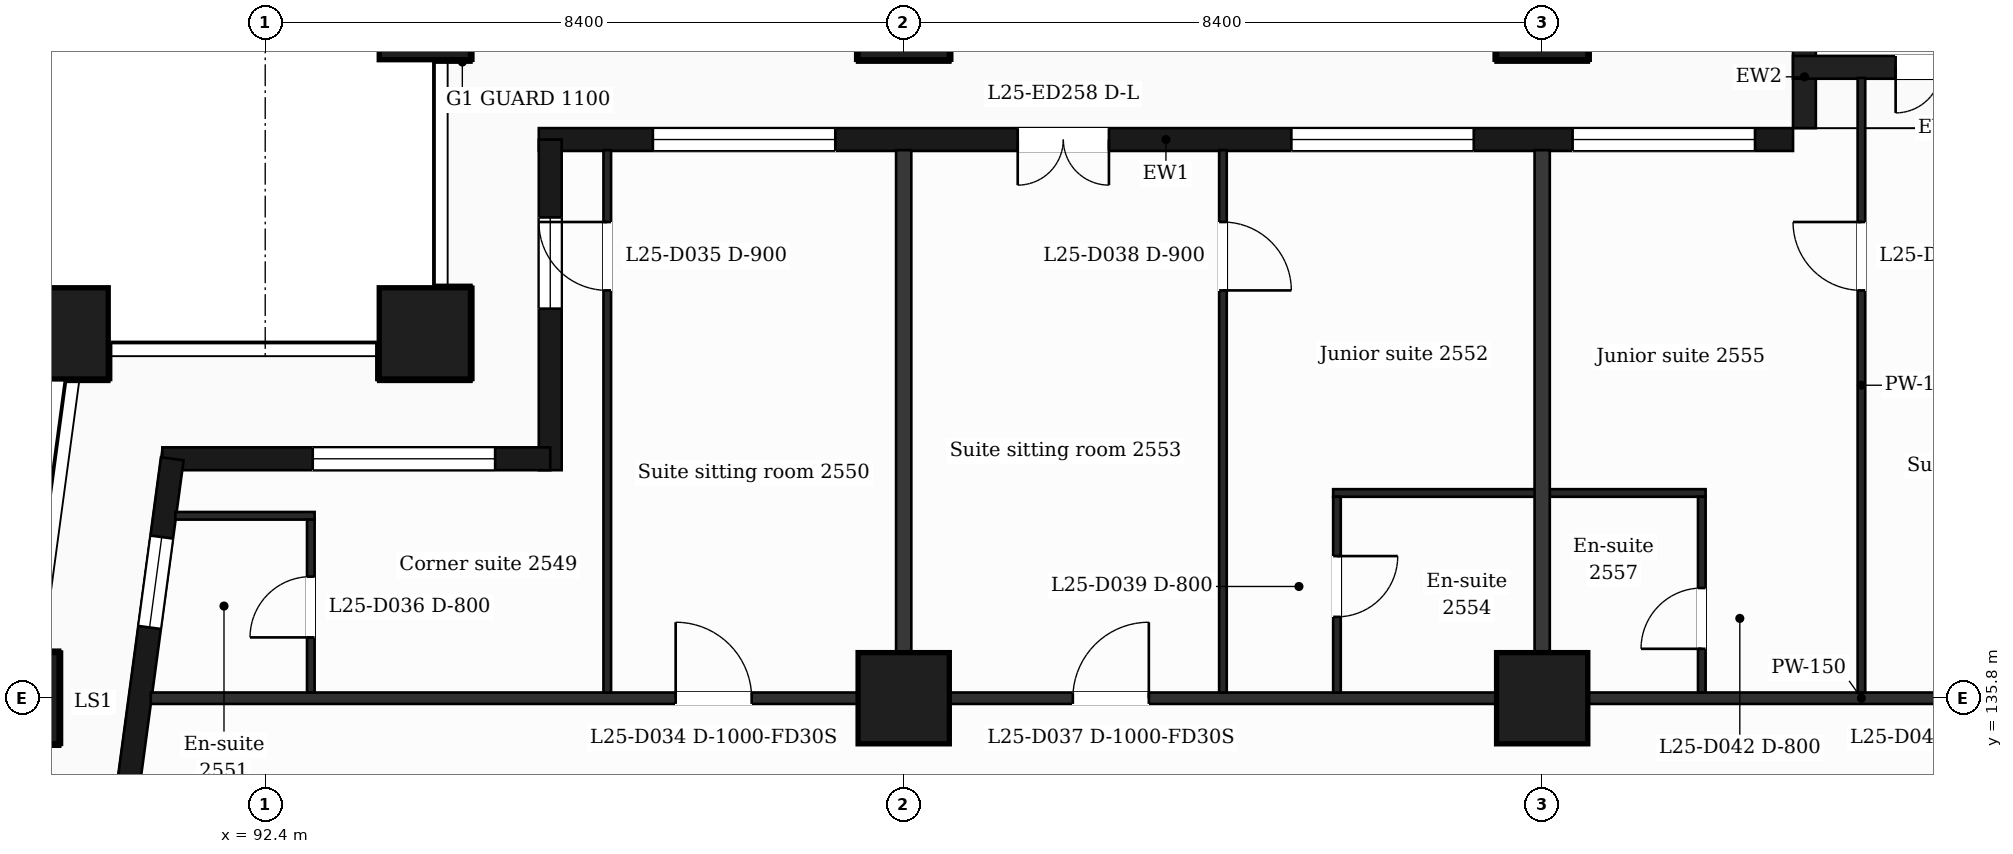
"""IFC4 building model, lengths in metres.
Left out: names, types, materials, properties, quantities, classifications, styles, units other than length and angle.
Written with IfcOpenShell. Run it as: python <this file> out.ifc"""

import sys

from ifc_helpers import new_model, si_unit, direction, frame, frame_2d, origin, origin_2d, place, context, subcontext, project, spatial, rectangle, extrude, element, fill, save


model = new_model("IFC4")
c1 = context("Model", 3, precision=1e-05, world=origin(), true_north=direction((0.0, 1.0)))
c2 = subcontext(c1, "Body", "Model", "MODEL_VIEW")
j1 = project(units=[si_unit("LENGTHUNIT", "METRE"), si_unit("PLANEANGLEUNIT", "RADIAN")], contexts=[c1])
p1 = place(None, origin())
s1 = spatial("IfcSite", under=j1, at=p1, CompositionType="ELEMENT")
p2 = place(p1, origin())
s2 = spatial("IfcBuilding", under=s1, at=p2, CompositionType="ELEMENT")
p3 = place(p2, frame((0.0, 0.0, 109.5)))
s3 = spatial("IfcBuildingStorey", under=s2, at=p3, CompositionType="ELEMENT", Elevation=109.5)
for number, where, z_axis, x_axis in (
    (1, (94.5, 140.6, 0.0), (0.0, 0.0, 1.0), (1.0, 0.0, 0.0)),
    (2, (89.735, 140.6, 0.0), (0.0, 0.0, 1.0), (1.0, 0.0, 0.0)),
    (3, (100.8, 135.8, 0.0), (0.0, 0.0, 1.0), (1.0, 0.0, 0.0)),
    (4, (109.2, 135.8, 0.0), (0.0, 0.0, 1.0), (1.0, 0.0, 0.0)),
    (5, (89.088, 135.8, 0.0), (0.0, 0.0, 1.0), (1.0, 0.0, 0.0)),
    (6, (100.8, 144.8, 0.0), (0.0, 0.0, 1.0), (1.0, 0.0, 0.0)),
    (7, (109.2, 144.8, 0.0), (0.0, 0.0, 1.0), (1.0, 0.0, 0.0)),
    (8, (94.5, 144.8, 0.0), (0.0, 0.0, 1.0), (1.0, 0.0, 0.0)),
):
    element("IfcColumn", number, at=place(p3, frame(where, z_axis=z_axis, x_axis=x_axis)), inside=s3, PredefinedType="COLUMN", context=c2, shape_type="SweptSolid", body=[
        extrude(rectangle(XDim=1.2, YDim=1.2, at=origin_2d()), origin(), (0.0, 0.0, 1.0), 3.7),
    ])
p4 = place(p3, frame((112.5, 143.15, 0.0), z_axis=(0.0, 0.0, 1.0), x_axis=(-1.0, 0.0, 0.0)))
e9 = element("IfcWall", 9, at=p4, inside=s3, PredefinedType="SOLIDWALL", context=c2, shape_type="SweptSolid", body=[
    extrude(rectangle(XDim=16.5, YDim=0.3, at=frame_2d((8.25, 0.0))), origin(), (0.0, 0.0, 1.0), 3.38),
])
p5 = place(p4, frame((0.5, 0.0, 0.9)))
e10 = element("IfcOpeningElement", 10, at=p5, cuts=e9, PredefinedType="OPENING", context=c2, shape_type="SweptSolid", body=[
    extrude(rectangle(XDim=2.4, YDim=2.1, at=frame_2d((1.2, 1.05))), frame((0.0, 0.16, 0.0), z_axis=(0.0, -1.0, 0.0), x_axis=(1.0, 0.0, 0.0)), (0.0, 0.0, 1.0), 0.32),
])
p6 = place(p4, frame((4.2, 0.0, 0.9)))
e11 = element("IfcOpeningElement", 11, at=p6, cuts=e9, PredefinedType="OPENING", context=c2, shape_type="SweptSolid", body=[
    extrude(rectangle(XDim=2.4, YDim=2.1, at=frame_2d((1.2, 1.05))), frame((0.0, 0.16, 0.0), z_axis=(0.0, -1.0, 0.0), x_axis=(1.0, 0.0, 0.0)), (0.0, 0.0, 1.0), 0.32),
])
p7 = place(p4, frame((9.0, 0.0, 0.0)))
e12 = element("IfcOpeningElement", 12, at=p7, cuts=e9, PredefinedType="OPENING", context=c2, shape_type="SweptSolid", body=[
    extrude(rectangle(XDim=1.2, YDim=2.4, at=frame_2d((0.6, 1.2))), frame((0.0, 0.16, 0.0), z_axis=(0.0, -1.0, 0.0), x_axis=(1.0, 0.0, 0.0)), (0.0, 0.0, 1.0), 0.32),
])
p8 = place(p4, frame((12.6, 0.0, 0.9)))
e13 = element("IfcOpeningElement", 13, at=p8, cuts=e9, PredefinedType="OPENING", context=c2, shape_type="SweptSolid", body=[
    extrude(rectangle(XDim=2.4, YDim=2.1, at=frame_2d((1.2, 1.05))), frame((0.0, 0.16, 0.0), z_axis=(0.0, -1.0, 0.0), x_axis=(1.0, 0.0, 0.0)), (0.0, 0.0, 1.0), 0.32),
])
p9 = place(p3, frame((112.65, 143.3, 0.0), z_axis=(0.0, 0.0, 1.0), x_axis=(0.0, 1.0, 0.0)))
e14 = element("IfcWall", 14, at=p9, inside=s3, PredefinedType="SOLIDWALL", context=c2, shape_type="SweptSolid", body=[
    extrude(rectangle(XDim=1.35, YDim=0.3, at=frame_2d((0.675, 0.0))), origin(), (0.0, 0.0, 1.0), 3.38),
])
p10 = place(p3, frame((116.4, 144.1, 0.0), z_axis=(0.0, 0.0, 1.0), x_axis=(-1.0, 0.0, 0.0)))
e15 = element("IfcWall", 15, at=p10, inside=s3, PredefinedType="SOLIDWALL", context=c2, shape_type="SweptSolid", body=[
    extrude(rectangle(XDim=3.9, YDim=0.3, at=frame_2d((1.95, 0.0))), origin(), (0.0, 0.0, 1.0), 3.38),
])
p11 = place(p10, frame((1.35, 0.0, 0.0)))
e16 = element("IfcOpeningElement", 16, at=p11, cuts=e15, PredefinedType="OPENING", context=c2, shape_type="SweptSolid", body=[
    extrude(rectangle(XDim=1.2, YDim=2.4, at=frame_2d((0.6, 1.2))), frame((0.0, 0.16, 0.0), z_axis=(0.0, -1.0, 0.0), x_axis=(1.0, 0.0, 0.0)), (0.0, 0.0, 1.0), 0.32),
])
p12 = place(p3, frame((96.15, 143.15, 0.0), z_axis=(0.0, 0.0, 1.0), x_axis=(0.0, -1.0, 0.0)))
e17 = element("IfcWall", 17, at=p12, inside=s3, PredefinedType="SOLIDWALL", context=c2, shape_type="SweptSolid", body=[
    extrude(rectangle(XDim=4.35, YDim=0.3, at=frame_2d((2.175, 0.0))), origin(), (0.0, 0.0, 1.0), 3.38),
])
p13 = place(p12, frame((1.025, 0.0, 0.9)))
e18 = element("IfcOpeningElement", 18, at=p13, cuts=e17, PredefinedType="OPENING", context=c2, shape_type="SweptSolid", body=[
    extrude(rectangle(XDim=1.2, YDim=2.1, at=frame_2d((0.6, 1.05))), frame((0.0, 0.16, 0.0), z_axis=(0.0, -1.0, 0.0), x_axis=(1.0, 0.0, 0.0)), (0.0, 0.0, 1.0), 0.32),
])
p14 = place(p3, frame((96.15, 138.95, 0.0), z_axis=(0.0, 0.0, 1.0), x_axis=(-1.0, 0.0, 0.0)))
e19 = element("IfcWall", 19, at=p14, inside=s3, PredefinedType="SOLIDWALL", context=c2, shape_type="SweptSolid", body=[
    extrude(rectangle(XDim=5.104, YDim=0.3, at=frame_2d((2.552, 0.0))), origin(), (0.0, 0.0, 1.0), 3.38),
])
p15 = place(p14, frame((0.725, 0.0, 0.9)))
e20 = element("IfcOpeningElement", 20, at=p15, cuts=e19, PredefinedType="OPENING", context=c2, shape_type="SweptSolid", body=[
    extrude(rectangle(XDim=2.4, YDim=2.1, at=frame_2d((1.2, 1.05))), frame((0.0, 0.16, 0.0), z_axis=(0.0, -1.0, 0.0), x_axis=(1.0, 0.0, 0.0)), (0.0, 0.0, 1.0), 0.32),
])
p16 = place(p3, frame((91.177, 138.95, 0.0), z_axis=(0.0, 0.0, 1.0), x_axis=(-0.133426664613, -0.991058689065, 0.0)))
e21 = element("IfcWall", 21, at=p16, inside=s3, PredefinedType="SOLIDWALL", context=c2, shape_type="SweptSolid", body=[
    extrude(rectangle(XDim=6.609, YDim=0.3, at=frame_2d((3.305, 0.0))), origin(), (0.0, 0.0, 1.0), 3.38),
])
p17 = place(p16, frame((1.039, 0.0, 0.9)))
e22 = element("IfcOpeningElement", 22, at=p17, cuts=e21, PredefinedType="OPENING", context=c2, shape_type="SweptSolid", body=[
    extrude(rectangle(XDim=1.2, YDim=2.1, at=frame_2d((0.6, 1.05))), frame((0.0, 0.16, 0.0), z_axis=(0.0, -1.0, 0.0), x_axis=(1.0, 0.0, 0.0)), (0.0, 0.0, 1.0), 0.32),
])
p18 = place(p16, frame((4.294, 0.0, 0.0)))
e23 = element("IfcOpeningElement", 23, at=p18, cuts=e21, PredefinedType="OPENING", context=c2, shape_type="SweptSolid", body=[
    extrude(rectangle(XDim=1.2, YDim=2.4, at=frame_2d((0.6, 1.2))), frame((0.0, 0.16, 0.0), z_axis=(0.0, -1.0, 0.0), x_axis=(1.0, 0.0, 0.0)), (0.0, 0.0, 1.0), 0.32),
])
p19 = place(p3, frame((90.895, 135.8, 0.0), z_axis=(0.0, 0.0, 1.0), x_axis=(1.0, 0.0, 0.0)))
e24 = element("IfcWall", 24, at=p19, inside=s3, PredefinedType="PARTITIONING", context=c2, shape_type="SweptSolid", body=[
    extrude(rectangle(XDim=45.011, YDim=0.15, at=frame_2d((22.505, 0.0))), origin(), (0.0, 0.0, 1.0), 3.38),
])
p20 = place(p19, frame((6.906, 0.0, 0.0)))
e25 = element("IfcOpeningElement", 25, at=p20, cuts=e24, PredefinedType="OPENING", context=c2, shape_type="SweptSolid", body=[
    extrude(rectangle(XDim=1.0, YDim=2.1, at=frame_2d((0.5, 1.05))), frame((0.0, 0.085, 0.0), z_axis=(0.0, -1.0, 0.0), x_axis=(1.0, 0.0, 0.0)), (0.0, 0.0, 1.0), 0.17),
])
p21 = place(p19, frame((12.13, 0.0, 0.0)))
e26 = element("IfcOpeningElement", 26, at=p21, cuts=e24, PredefinedType="OPENING", context=c2, shape_type="SweptSolid", body=[
    extrude(rectangle(XDim=1.0, YDim=2.1, at=frame_2d((0.5, 1.05))), frame((0.0, 0.085, 0.0), z_axis=(0.0, -1.0, 0.0), x_axis=(1.0, 0.0, 0.0)), (0.0, 0.0, 1.0), 0.17),
])
p22 = place(p19, frame((23.48, 0.0, 0.0)))
e27 = element("IfcOpeningElement", 27, at=p22, cuts=e24, PredefinedType="OPENING", context=c2, shape_type="SweptSolid", body=[
    extrude(rectangle(XDim=1.0, YDim=2.1, at=frame_2d((0.5, 1.05))), frame((0.0, 0.085, 0.0), z_axis=(0.0, -1.0, 0.0), x_axis=(1.0, 0.0, 0.0)), (0.0, 0.0, 1.0), 0.17),
])
p23 = place(p19, frame((27.515, 0.0, 0.0)))
e28 = element("IfcOpeningElement", 28, at=p23, cuts=e24, PredefinedType="OPENING", context=c2, shape_type="SweptSolid", body=[
    extrude(rectangle(XDim=0.95, YDim=2.1, at=frame_2d((0.475, 1.05))), frame((0.0, 0.085, 0.0), z_axis=(0.0, -1.0, 0.0), x_axis=(1.0, 0.0, 0.0)), (0.0, 0.0, 1.0), 0.17),
])
p24 = place(p19, frame((31.18, 0.0, 0.0)))
e29 = element("IfcOpeningElement", 29, at=p24, cuts=e24, PredefinedType="OPENING", context=c2, shape_type="SweptSolid", body=[
    extrude(rectangle(XDim=0.95, YDim=2.1, at=frame_2d((0.475, 1.05))), frame((0.0, 0.085, 0.0), z_axis=(0.0, -1.0, 0.0), x_axis=(1.0, 0.0, 0.0)), (0.0, 0.0, 1.0), 0.17),
])
p25 = place(p19, frame((36.005, 0.0, 0.0)))
e30 = element("IfcOpeningElement", 30, at=p25, cuts=e24, PredefinedType="OPENING", context=c2, shape_type="SweptSolid", body=[
    extrude(rectangle(XDim=1.0, YDim=2.1, at=frame_2d((0.5, 1.05))), frame((0.0, 0.085, 0.0), z_axis=(0.0, -1.0, 0.0), x_axis=(1.0, 0.0, 0.0)), (0.0, 0.0, 1.0), 0.17),
])
p26 = place(p3, frame((91.218, 138.2, 0.0), z_axis=(0.0, 0.0, 1.0), x_axis=(1.0, 0.0, 0.0)))
e31 = element("IfcWall", 31, at=p26, inside=s3, PredefinedType="PARTITIONING", context=c2, shape_type="SweptSolid", body=[
    extrude(rectangle(XDim=1.832, YDim=0.1, at=frame_2d((0.916, 0.0))), origin(), (0.0, 0.0, 1.0), 3.38),
])
p27 = place(p3, frame((106.45, 138.5, 0.0), z_axis=(0.0, 0.0, 1.0), x_axis=(1.0, 0.0, 0.0)))
e32 = element("IfcWall", 32, at=p27, inside=s3, PredefinedType="PARTITIONING", context=c2, shape_type="SweptSolid", body=[
    extrude(rectangle(XDim=4.9, YDim=0.1, at=frame_2d((2.45, 0.0))), origin(), (0.0, 0.0, 1.0), 3.38),
])
p28 = place(p3, frame((93.0, 135.875, 0.0), z_axis=(0.0, 0.0, 1.0), x_axis=(0.0, 1.0, 0.0)))
e33 = element("IfcWall", 33, at=p28, inside=s3, PredefinedType="PARTITIONING", context=c2, shape_type="SweptSolid", body=[
    extrude(rectangle(XDim=2.275, YDim=0.1, at=frame_2d((1.137, 0.0))), origin(), (0.0, 0.0, 1.0), 3.38),
])
p29 = place(p28, frame((0.725, 0.0, 0.0)))
e34 = element("IfcOpeningElement", 34, at=p29, cuts=e33, PredefinedType="OPENING", context=c2, shape_type="SweptSolid", body=[
    extrude(rectangle(XDim=0.8, YDim=2.1, at=frame_2d((0.4, 1.05))), frame((0.0, 0.06, 0.0), z_axis=(0.0, -1.0, 0.0), x_axis=(1.0, 0.0, 0.0)), (0.0, 0.0, 1.0), 0.12),
])
p30 = place(p3, frame((96.9, 135.875, 0.0), z_axis=(0.0, 0.0, 1.0), x_axis=(0.0, 1.0, 0.0)))
e35 = element("IfcWall", 35, at=p30, inside=s3, PredefinedType="PARTITIONING", context=c2, shape_type="SweptSolid", body=[
    extrude(rectangle(XDim=7.135, YDim=0.1, at=frame_2d((3.567, 0.0))), origin(), (0.0, 0.0, 1.0), 3.38),
])
p31 = place(p30, frame((5.29, 0.0, 0.0)))
e36 = element("IfcOpeningElement", 36, at=p31, cuts=e35, PredefinedType="OPENING", context=c2, shape_type="SweptSolid", body=[
    extrude(rectangle(XDim=0.9, YDim=2.1, at=frame_2d((0.45, 1.05))), frame((0.0, 0.06, 0.0), z_axis=(0.0, -1.0, 0.0), x_axis=(1.0, 0.0, 0.0)), (0.0, 0.0, 1.0), 0.12),
])
p32 = place(p3, frame((100.8, 135.875, 0.0), z_axis=(0.0, 0.0, 1.0), x_axis=(0.0, 1.0, 0.0)))
e37 = element("IfcWall", 37, at=p32, inside=s3, PredefinedType="PARTITIONING", context=c2, shape_type="SweptSolid", body=[
    extrude(rectangle(XDim=7.135, YDim=0.2, at=frame_2d((3.567, 0.0))), origin(), (0.0, 0.0, 1.0), 3.38),
])
p33 = place(p3, frame((105.0, 135.875, 0.0), z_axis=(0.0, 0.0, 1.0), x_axis=(0.0, 1.0, 0.0)))
e38 = element("IfcWall", 38, at=p33, inside=s3, PredefinedType="PARTITIONING", context=c2, shape_type="SweptSolid", body=[
    extrude(rectangle(XDim=7.135, YDim=0.1, at=frame_2d((3.567, 0.0))), origin(), (0.0, 0.0, 1.0), 3.38),
])
p34 = place(p33, frame((5.29, 0.0, 0.0)))
e39 = element("IfcOpeningElement", 39, at=p34, cuts=e38, PredefinedType="OPENING", context=c2, shape_type="SweptSolid", body=[
    extrude(rectangle(XDim=0.9, YDim=2.1, at=frame_2d((0.45, 1.05))), frame((0.0, 0.06, 0.0), z_axis=(0.0, -1.0, 0.0), x_axis=(1.0, 0.0, 0.0)), (0.0, 0.0, 1.0), 0.12),
])
p35 = place(p3, frame((106.5, 135.875, 0.0), z_axis=(0.0, 0.0, 1.0), x_axis=(0.0, 1.0, 0.0)))
e40 = element("IfcWall", 40, at=p35, inside=s3, PredefinedType="PARTITIONING", context=c2, shape_type="SweptSolid", body=[
    extrude(rectangle(XDim=2.575, YDim=0.1, at=frame_2d((1.288, 0.0))), origin(), (0.0, 0.0, 1.0), 3.38),
])
p36 = place(p35, frame((0.995, 0.0, 0.0)))
e41 = element("IfcOpeningElement", 41, at=p36, cuts=e40, PredefinedType="OPENING", context=c2, shape_type="SweptSolid", body=[
    extrude(rectangle(XDim=0.8, YDim=2.1, at=frame_2d((0.4, 1.05))), frame((0.0, 0.06, 0.0), z_axis=(0.0, -1.0, 0.0), x_axis=(1.0, 0.0, 0.0)), (0.0, 0.0, 1.0), 0.12),
])
p37 = place(p3, frame((109.2, 135.875, 0.0), z_axis=(0.0, 0.0, 1.0), x_axis=(0.0, 1.0, 0.0)))
e42 = element("IfcWall", 42, at=p37, inside=s3, PredefinedType="PARTITIONING", context=c2, shape_type="SweptSolid", body=[
    extrude(rectangle(XDim=7.135, YDim=0.2, at=frame_2d((3.567, 0.0))), origin(), (0.0, 0.0, 1.0), 3.38),
])
p38 = place(p3, frame((111.3, 135.875, 0.0), z_axis=(0.0, 0.0, 1.0), x_axis=(0.0, 1.0, 0.0)))
e43 = element("IfcWall", 43, at=p38, inside=s3, PredefinedType="PARTITIONING", context=c2, shape_type="SweptSolid", body=[
    extrude(rectangle(XDim=2.575, YDim=0.1, at=frame_2d((1.288, 0.0))), origin(), (0.0, 0.0, 1.0), 3.38),
])
p39 = place(p38, frame((0.575, 0.0, 0.0)))
e44 = element("IfcOpeningElement", 44, at=p39, cuts=e43, PredefinedType="OPENING", context=c2, shape_type="SweptSolid", body=[
    extrude(rectangle(XDim=0.8, YDim=2.1, at=frame_2d((0.4, 1.05))), frame((0.0, 0.06, 0.0), z_axis=(0.0, -1.0, 0.0), x_axis=(1.0, 0.0, 0.0)), (0.0, 0.0, 1.0), 0.12),
])
p40 = place(p3, frame((113.4, 135.875, 0.0), z_axis=(0.0, 0.0, 1.0), x_axis=(0.0, 1.0, 0.0)))
e45 = element("IfcWall", 45, at=p40, inside=s3, PredefinedType="PARTITIONING", context=c2, shape_type="SweptSolid", body=[
    extrude(rectangle(XDim=8.085, YDim=0.1, at=frame_2d((4.042, 0.0))), origin(), (0.0, 0.0, 1.0), 3.38),
])
p41 = place(p40, frame((5.29, 0.0, 0.0)))
e46 = element("IfcOpeningElement", 46, at=p41, cuts=e45, PredefinedType="OPENING", context=c2, shape_type="SweptSolid", body=[
    extrude(rectangle(XDim=0.9, YDim=2.1, at=frame_2d((0.45, 1.05))), frame((0.0, 0.06, 0.0), z_axis=(0.0, -1.0, 0.0), x_axis=(1.0, 0.0, 0.0)), (0.0, 0.0, 1.0), 0.12),
])
p42 = place(p5, origin())
e47 = element("IfcWindow", 47, at=p42, inside=s3, PartitioningType="SINGLE_PANEL", PredefinedType="WINDOW", context=c2, shape_type="SweptSolid", body=[
    extrude(rectangle(XDim=2.4, YDim=2.1, at=frame_2d((1.2, 1.05))), frame((0.0, 0.03, 0.0), z_axis=(0.0, -1.0, 0.0), x_axis=(1.0, 0.0, 0.0)), (0.0, 0.0, 1.0), 0.06),
])
fill(e10, e47)
p43 = place(p6, origin())
e48 = element("IfcWindow", 48, at=p43, inside=s3, PartitioningType="SINGLE_PANEL", PredefinedType="WINDOW", context=c2, shape_type="SweptSolid", body=[
    extrude(rectangle(XDim=2.4, YDim=2.1, at=frame_2d((1.2, 1.05))), frame((0.0, 0.03, 0.0), z_axis=(0.0, -1.0, 0.0), x_axis=(1.0, 0.0, 0.0)), (0.0, 0.0, 1.0), 0.06),
])
fill(e11, e48)
p44 = place(p7, origin())
e49 = element("IfcDoor", 49, at=p44, inside=s3, OperationType="DOUBLE_DOOR_SINGLE_SWING", PredefinedType="DOOR", context=c2, shape_type="SweptSolid", body=[
    extrude(rectangle(XDim=1.2, YDim=2.4, at=frame_2d((0.6, 1.2))), frame((0.0, 0.025, 0.0), z_axis=(0.0, -1.0, 0.0), x_axis=(1.0, 0.0, 0.0)), (0.0, 0.0, 1.0), 0.05),
])
fill(e12, e49)
p45 = place(p8, origin())
e50 = element("IfcWindow", 50, at=p45, inside=s3, PartitioningType="SINGLE_PANEL", PredefinedType="WINDOW", context=c2, shape_type="SweptSolid", body=[
    extrude(rectangle(XDim=2.4, YDim=2.1, at=frame_2d((1.2, 1.05))), frame((0.0, 0.03, 0.0), z_axis=(0.0, -1.0, 0.0), x_axis=(1.0, 0.0, 0.0)), (0.0, 0.0, 1.0), 0.06),
])
fill(e13, e50)
p46 = place(p11, origin())
e51 = element("IfcDoor", 51, at=p46, inside=s3, OperationType="DOUBLE_DOOR_SINGLE_SWING", PredefinedType="DOOR", context=c2, shape_type="SweptSolid", body=[
    extrude(rectangle(XDim=1.2, YDim=2.4, at=frame_2d((0.6, 1.2))), frame((0.0, 0.025, 0.0), z_axis=(0.0, -1.0, 0.0), x_axis=(1.0, 0.0, 0.0)), (0.0, 0.0, 1.0), 0.05),
])
fill(e16, e51)
p47 = place(p13, origin())
e52 = element("IfcWindow", 52, at=p47, inside=s3, PartitioningType="SINGLE_PANEL", PredefinedType="WINDOW", context=c2, shape_type="SweptSolid", body=[
    extrude(rectangle(XDim=1.2, YDim=2.1, at=frame_2d((0.6, 1.05))), frame((0.0, 0.03, 0.0), z_axis=(0.0, -1.0, 0.0), x_axis=(1.0, 0.0, 0.0)), (0.0, 0.0, 1.0), 0.06),
])
fill(e18, e52)
p48 = place(p15, origin())
e53 = element("IfcWindow", 53, at=p48, inside=s3, PartitioningType="SINGLE_PANEL", PredefinedType="WINDOW", context=c2, shape_type="SweptSolid", body=[
    extrude(rectangle(XDim=2.4, YDim=2.1, at=frame_2d((1.2, 1.05))), frame((0.0, 0.03, 0.0), z_axis=(0.0, -1.0, 0.0), x_axis=(1.0, 0.0, 0.0)), (0.0, 0.0, 1.0), 0.06),
])
fill(e20, e53)
p49 = place(p17, origin())
e54 = element("IfcWindow", 54, at=p49, inside=s3, PartitioningType="SINGLE_PANEL", PredefinedType="WINDOW", context=c2, shape_type="SweptSolid", body=[
    extrude(rectangle(XDim=1.2, YDim=2.1, at=frame_2d((0.6, 1.05))), frame((0.0, 0.03, 0.0), z_axis=(0.0, -1.0, 0.0), x_axis=(1.0, 0.0, 0.0)), (0.0, 0.0, 1.0), 0.06),
])
fill(e22, e54)
p50 = place(p20, origin())
e55 = element("IfcDoor", 55, at=p50, inside=s3, OperationType="SINGLE_SWING_LEFT", PredefinedType="DOOR", context=c2, shape_type="SweptSolid", body=[
    extrude(rectangle(XDim=1.0, YDim=2.1, at=frame_2d((0.5, 1.05))), frame((0.0, 0.025, 0.0), z_axis=(0.0, -1.0, 0.0), x_axis=(1.0, 0.0, 0.0)), (0.0, 0.0, 1.0), 0.05),
])
fill(e25, e55)
p51 = place(p31, origin())
e56 = element("IfcDoor", 56, at=p51, inside=s3, OperationType="SINGLE_SWING_RIGHT", PredefinedType="DOOR", context=c2, shape_type="SweptSolid", body=[
    extrude(rectangle(XDim=0.9, YDim=2.1, at=frame_2d((0.45, 1.05))), frame((0.0, 0.025, 0.0), z_axis=(0.0, -1.0, 0.0), x_axis=(1.0, 0.0, 0.0)), (0.0, 0.0, 1.0), 0.05),
])
fill(e36, e56)
p52 = place(p29, origin())
e57 = element("IfcDoor", 57, at=p52, inside=s3, OperationType="SINGLE_SWING_LEFT", PredefinedType="DOOR", context=c2, shape_type="SweptSolid", body=[
    extrude(rectangle(XDim=0.8, YDim=2.1, at=frame_2d((0.4, 1.05))), frame((0.0, 0.025, 0.0), z_axis=(0.0, -1.0, 0.0), x_axis=(1.0, 0.0, 0.0)), (0.0, 0.0, 1.0), 0.05),
])
fill(e34, e57)
p53 = place(p21, origin())
e58 = element("IfcDoor", 58, at=p53, inside=s3, OperationType="SINGLE_SWING_RIGHT", PredefinedType="DOOR", context=c2, shape_type="SweptSolid", body=[
    extrude(rectangle(XDim=1.0, YDim=2.1, at=frame_2d((0.5, 1.05))), frame((0.0, 0.025, 0.0), z_axis=(0.0, -1.0, 0.0), x_axis=(1.0, 0.0, 0.0)), (0.0, 0.0, 1.0), 0.05),
])
fill(e26, e58)
p54 = place(p34, origin())
e59 = element("IfcDoor", 59, at=p54, inside=s3, OperationType="SINGLE_SWING_LEFT", PredefinedType="DOOR", context=c2, shape_type="SweptSolid", body=[
    extrude(rectangle(XDim=0.9, YDim=2.1, at=frame_2d((0.45, 1.05))), frame((0.0, 0.025, 0.0), z_axis=(0.0, -1.0, 0.0), x_axis=(1.0, 0.0, 0.0)), (0.0, 0.0, 1.0), 0.05),
])
fill(e39, e59)
p55 = place(p36, origin())
e60 = element("IfcDoor", 60, at=p55, inside=s3, OperationType="SINGLE_SWING_RIGHT", PredefinedType="DOOR", context=c2, shape_type="SweptSolid", body=[
    extrude(rectangle(XDim=0.8, YDim=2.1, at=frame_2d((0.4, 1.05))), frame((0.0, 0.025, 0.0), z_axis=(0.0, -1.0, 0.0), x_axis=(1.0, 0.0, 0.0)), (0.0, 0.0, 1.0), 0.05),
])
fill(e41, e60)
p56 = place(p41, origin())
e61 = element("IfcDoor", 61, at=p56, inside=s3, OperationType="SINGLE_SWING_RIGHT", PredefinedType="DOOR", context=c2, shape_type="SweptSolid", body=[
    extrude(rectangle(XDim=0.9, YDim=2.1, at=frame_2d((0.45, 1.05))), frame((0.0, 0.025, 0.0), z_axis=(0.0, -1.0, 0.0), x_axis=(1.0, 0.0, 0.0)), (0.0, 0.0, 1.0), 0.05),
])
fill(e46, e61)
p57 = place(p39, origin())
e62 = element("IfcDoor", 62, at=p57, inside=s3, OperationType="SINGLE_SWING_LEFT", PredefinedType="DOOR", context=c2, shape_type="SweptSolid", body=[
    extrude(rectangle(XDim=0.8, YDim=2.1, at=frame_2d((0.4, 1.05))), frame((0.0, 0.025, 0.0), z_axis=(0.0, -1.0, 0.0), x_axis=(1.0, 0.0, 0.0)), (0.0, 0.0, 1.0), 0.05),
])
fill(e44, e62)
save(model, sys.argv[1])
